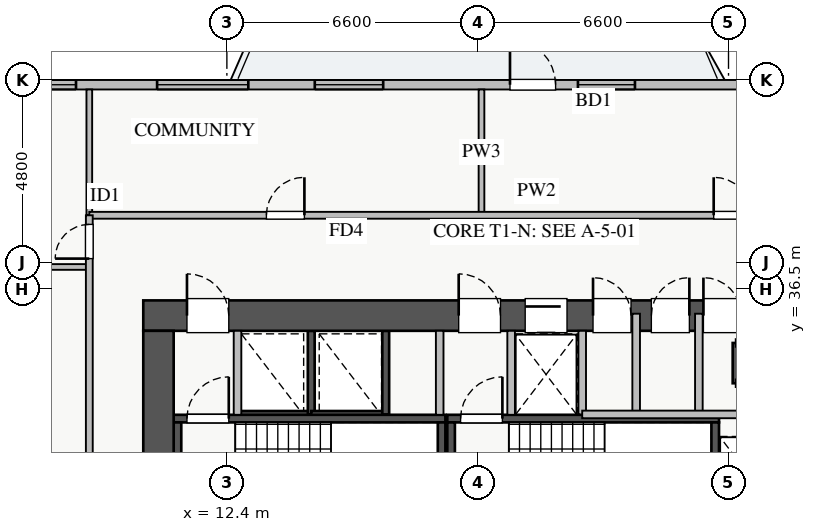
"""IFC4 building model, lengths in metres.
Left out: names, types, materials, properties, quantities, classifications, styles, units other than length and angle.
Written with IfcOpenShell. Run it as: python <this file> out.ifc"""

import sys

from ifc_helpers import new_model, si_unit, direction, frame, frame_2d, origin, place, context, subcontext, project, spatial, rectangle, extrude, source, transform, mapped, element, fill, save


model = new_model("IFC4")
c1 = context("Model", 3, precision=1e-05, world=origin(), true_north=direction((0.0, 1.0)))
c2 = subcontext(c1, "Body", "Model", "MODEL_VIEW")
j1 = project(units=[si_unit("LENGTHUNIT", "METRE"), si_unit("PLANEANGLEUNIT", "RADIAN")], contexts=[c1])
p1 = place(None, origin())
s1 = spatial("IfcSite", under=j1, at=p1, CompositionType="ELEMENT")
p2 = place(p1, origin())
s2 = spatial("IfcBuilding", under=s1, at=p2, CompositionType="ELEMENT")
p3 = place(p2, frame((0.0, 0.0, 29.5)))
s3 = spatial("IfcBuildingStorey", under=s2, at=p3, CompositionType="ELEMENT", Elevation=29.5)
p4 = place(p3, frame((12.68, 33.2, 0.0), z_axis=(0.0, 0.0, 1.0), x_axis=(1.0, 0.0, 0.0)))
e1 = element("IfcWall", 1, at=p4, inside=s3, PredefinedType="SHEAR", context=c2, shape_type="SweptSolid", body=[
    extrude(rectangle(XDim=1.94, YDim=0.18, at=frame_2d((0.97, 0.0))), origin(), (0.0, 0.0, 1.0), 3.07),
])
p5 = place(p3, frame((14.62, 33.2, 0.0), z_axis=(0.0, 0.0, 1.0), x_axis=(0.0, 1.0, 0.0)))
e2 = element("IfcWall", 2, at=p5, inside=s3, PredefinedType="SHEAR", context=c2, shape_type="SweptSolid", body=[
    extrude(rectangle(XDim=2.2, YDim=0.18, at=frame_2d((1.1, 0.0))), origin(), (0.0, 0.0, 1.0), 3.07),
])
p6 = place(p3, frame((25.8, 34.02, 0.0), z_axis=(0.0, 0.0, 1.0), x_axis=(0.0, 1.0, 0.0)))
e3 = element("IfcWall", 3, at=p6, inside=s3, PredefinedType="SHEAR", context=c2, shape_type="SweptSolid", body=[
    extrude(rectangle(XDim=1.06, YDim=0.18, at=frame_2d((0.53, 0.0))), origin(), (0.0, 0.0, 1.0), 3.07),
])
p7 = place(p3, frame((14.62, 33.2, 0.0), z_axis=(0.0, 0.0, 1.0), x_axis=(1.0, 0.0, 0.0)))
e4 = element("IfcWall", 4, at=p7, inside=s3, PredefinedType="SHEAR", context=c2, shape_type="SweptSolid", body=[
    extrude(rectangle(XDim=1.96, YDim=0.18, at=frame_2d((0.98, 0.0))), origin(), (0.0, 0.0, 1.0), 3.07),
])
p8 = place(p3, frame((16.58, 33.2, 0.0), z_axis=(0.0, 0.0, 1.0), x_axis=(0.0, 1.0, 0.0)))
e5 = element("IfcWall", 5, at=p8, inside=s3, PredefinedType="SHEAR", context=c2, shape_type="SweptSolid", body=[
    extrude(rectangle(XDim=2.2, YDim=0.18, at=frame_2d((1.1, 0.0))), origin(), (0.0, 0.0, 1.0), 3.07),
])
p9 = place(p3, frame((19.88, 33.2, 0.0), z_axis=(0.0, 0.0, 1.0), x_axis=(1.0, 0.0, 0.0)))
e6 = element("IfcWall", 6, at=p9, inside=s3, PredefinedType="SHEAR", context=c2, shape_type="SweptSolid", body=[
    extrude(rectangle(XDim=1.87, YDim=0.18, at=frame_2d((0.935, 0.0))), origin(), (0.0, 0.0, 1.0), 3.07),
])
p10 = place(p3, frame((11.0, 33.09, 0.0), z_axis=(0.0, 0.0, 1.0), x_axis=(1.0, 0.0, 0.0)))
e7 = element("IfcWall", 7, at=p10, inside=s3, PredefinedType="SHEAR", context=c2, shape_type="SweptSolid", body=[
    extrude(rectangle(XDim=7.15, YDim=0.2, at=frame_2d((3.575, 0.0))), origin(), (0.0, 0.0, 1.0), 3.25),
])
p11 = place(p10, frame((0.35, 0.0, 0.0)))
e8 = element("IfcOpeningElement", 8, at=p11, cuts=e7, PredefinedType="OPENING", context=c2, shape_type="SweptSolid", body=[
    extrude(rectangle(XDim=1.1, YDim=2.05, at=frame_2d((0.55, 1.025))), frame((0.0, 0.11, 0.0), z_axis=(0.0, -1.0, 0.0), x_axis=(1.0, 0.0, 0.0)), (0.0, 0.0, 1.0), 0.22),
])
for number, where, z_axis, x_axis in (
    (9, (11.1, 30.05, 0.0), (0.0, 0.0, 1.0), (0.0, 1.0, 0.0)),
    (10, (18.05, 30.05, 0.0), (0.0, 0.0, 1.0), (0.0, 1.0, 0.0)),
):
    element("IfcWall", number, at=place(p3, frame(where, z_axis=z_axis, x_axis=x_axis)), inside=s3, PredefinedType="SHEAR", context=c2, shape_type="SweptSolid", body=[
        extrude(rectangle(XDim=2.94, YDim=0.2, at=frame_2d((1.47, 0.0))), origin(), (0.0, 0.0, 1.0), 3.25),
    ])
p12 = place(p3, frame((18.2, 33.09, 0.0), z_axis=(0.0, 0.0, 1.0), x_axis=(1.0, 0.0, 0.0)))
e11 = element("IfcWall", 11, at=p12, inside=s3, PredefinedType="SHEAR", context=c2, shape_type="SweptSolid", body=[
    extrude(rectangle(XDim=7.15, YDim=0.2, at=frame_2d((3.575, 0.0))), origin(), (0.0, 0.0, 1.0), 3.25),
])
p13 = place(p12, frame((0.35, 0.0, 0.0)))
e12 = element("IfcOpeningElement", 12, at=p13, cuts=e11, PredefinedType="OPENING", context=c2, shape_type="SweptSolid", body=[
    extrude(rectangle(XDim=1.1, YDim=2.05, at=frame_2d((0.55, 1.025))), frame((0.0, 0.11, 0.0), z_axis=(0.0, -1.0, 0.0), x_axis=(1.0, 0.0, 0.0)), (0.0, 0.0, 1.0), 0.22),
])
for number, where, z_axis, x_axis in (
    (13, (18.3, 30.05, 0.0), (0.0, 0.0, 1.0), (0.0, 1.0, 0.0)),
    (14, (25.25, 30.05, 0.0), (0.0, 0.0, 1.0), (0.0, 1.0, 0.0)),
):
    element("IfcWall", number, at=place(p3, frame(where, z_axis=z_axis, x_axis=x_axis)), inside=s3, PredefinedType="SHEAR", context=c2, shape_type="SweptSolid", body=[
        extrude(rectangle(XDim=2.94, YDim=0.2, at=frame_2d((1.47, 0.0))), origin(), (0.0, 0.0, 1.0), 3.25),
    ])
p14 = place(p3, frame((10.2, 35.8, 0.0), z_axis=(0.0, 0.0, 1.0), x_axis=(1.0, 0.0, 0.0)))
e15 = element("IfcWall", 15, at=p14, inside=s3, PredefinedType="SHEAR", context=c2, shape_type="SweptSolid", body=[
    extrude(rectangle(XDim=17.6, YDim=0.8, at=frame_2d((8.8, 0.0))), origin(), (0.0, 0.0, 1.0), 3.25),
])
p15 = place(p14, frame((1.15, 0.0, 0.0)))
e16 = element("IfcOpeningElement", 16, at=p15, cuts=e15, PredefinedType="OPENING", context=c2, shape_type="SweptSolid", body=[
    extrude(rectangle(XDim=1.1, YDim=2.05, at=frame_2d((0.55, 1.025))), frame((0.0, 0.41, 0.0), z_axis=(0.0, -1.0, 0.0), x_axis=(1.0, 0.0, 0.0)), (0.0, 0.0, 1.0), 0.82),
])
p16 = place(p14, frame((8.3, 0.0, 0.0)))
e17 = element("IfcOpeningElement", 17, at=p16, cuts=e15, PredefinedType="OPENING", context=c2, shape_type="SweptSolid", body=[
    extrude(rectangle(XDim=1.1, YDim=2.05, at=frame_2d((0.55, 1.025))), frame((0.0, 0.41, 0.0), z_axis=(0.0, -1.0, 0.0), x_axis=(1.0, 0.0, 0.0)), (0.0, 0.0, 1.0), 0.82),
])
p17 = place(p14, frame((10.05, 0.0, 0.0)))
e18 = element("IfcOpeningElement", 18, at=p17, cuts=e15, PredefinedType="OPENING", context=c2, shape_type="SweptSolid", body=[
    extrude(rectangle(XDim=1.1, YDim=2.05, at=frame_2d((0.55, 1.025))), frame((0.0, 0.41, 0.0), z_axis=(0.0, -1.0, 0.0), x_axis=(1.0, 0.0, 0.0)), (0.0, 0.0, 1.0), 0.82),
])
p18 = place(p14, frame((14.74, 0.0, 0.0)))
e19 = element("IfcOpeningElement", 19, at=p18, cuts=e15, PredefinedType="OPENING", context=c2, shape_type="SweptSolid", body=[
    extrude(rectangle(XDim=1.0, YDim=2.05, at=frame_2d((0.5, 1.025))), frame((0.0, 0.41, 0.0), z_axis=(0.0, -1.0, 0.0), x_axis=(1.0, 0.0, 0.0)), (0.0, 0.0, 1.0), 0.82),
])
p19 = place(p14, frame((11.835, 0.0, 0.0)))
e20 = element("IfcOpeningElement", 20, at=p19, cuts=e15, PredefinedType="OPENING", context=c2, shape_type="SweptSolid", body=[
    extrude(rectangle(XDim=1.0, YDim=2.05, at=frame_2d((0.5, 1.025))), frame((0.0, 0.41, 0.0), z_axis=(0.0, -1.0, 0.0), x_axis=(1.0, 0.0, 0.0)), (0.0, 0.0, 1.0), 0.82),
])
p20 = place(p14, frame((13.37, 0.0, 0.0)))
e21 = element("IfcOpeningElement", 21, at=p20, cuts=e15, PredefinedType="OPENING", context=c2, shape_type="SweptSolid", body=[
    extrude(rectangle(XDim=1.0, YDim=2.05, at=frame_2d((0.5, 1.025))), frame((0.0, 0.41, 0.0), z_axis=(0.0, -1.0, 0.0), x_axis=(1.0, 0.0, 0.0)), (0.0, 0.0, 1.0), 0.82),
])
p21 = place(p3, frame((10.6, 29.8, 0.0), z_axis=(0.0, 0.0, 1.0), x_axis=(0.0, 1.0, 0.0)))
e22 = element("IfcWall", 22, at=p21, inside=s3, PredefinedType="SHEAR", context=c2, shape_type="SweptSolid", body=[
    extrude(rectangle(XDim=5.6, YDim=0.8, at=frame_2d((2.8, 0.0))), origin(), (0.0, 0.0, 1.0), 3.25),
])
p22 = place(p3, frame((5.45, 41.875, 0.0), z_axis=(0.0, 0.0, 1.0), x_axis=(1.0, 0.0, 0.0)))
e23 = element("IfcWall", 23, at=p22, inside=s3, PredefinedType="STANDARD", context=c2, shape_type="SweptSolid", body=[
    extrude(rectangle(XDim=27.1, YDim=0.25, at=frame_2d((13.55, 0.0))), origin(), (0.0, 0.0, 1.0), 2.61),
])
p23 = place(p22, frame((14.4, 0.0, 0.0)))
e24 = element("IfcOpeningElement", 24, at=p23, cuts=e23, PredefinedType="OPENING", context=c2, shape_type="SweptSolid", body=[
    extrude(rectangle(XDim=1.2, YDim=2.1, at=frame_2d((0.6, 1.05))), frame((0.0, 0.135, 0.0), z_axis=(0.0, -1.0, 0.0), x_axis=(1.0, 0.0, 0.0)), (0.0, 0.0, 1.0), 0.27),
])
p24 = place(p22, frame((1.48, 0.0, 0.9)))
e25 = element("IfcOpeningElement", 25, at=p24, cuts=e23, PredefinedType="OPENING", context=c2, shape_type="SweptSolid", body=[
    extrude(rectangle(XDim=1.5, YDim=1.5, at=frame_2d((0.75, 0.75))), frame((0.0, 0.135, 0.0), z_axis=(0.0, -1.0, 0.0), x_axis=(1.0, 0.0, 0.0)), (0.0, 0.0, 1.0), 0.27),
])
p25 = place(p22, frame((9.263, 0.0, 0.9)))
e26 = element("IfcOpeningElement", 26, at=p25, cuts=e23, PredefinedType="OPENING", context=c2, shape_type="SweptSolid", body=[
    extrude(rectangle(XDim=1.8, YDim=1.45, at=frame_2d((0.9, 0.725))), frame((0.0, 0.135, 0.0), z_axis=(0.0, -1.0, 0.0), x_axis=(1.0, 0.0, 0.0)), (0.0, 0.0, 1.0), 0.27),
])
p26 = place(p22, frame((16.188, 0.0, 0.9)))
e27 = element("IfcOpeningElement", 27, at=p26, cuts=e23, PredefinedType="OPENING", context=c2, shape_type="SweptSolid", body=[
    extrude(rectangle(XDim=1.5, YDim=1.45, at=frame_2d((0.75, 0.725))), frame((0.0, 0.135, 0.0), z_axis=(0.0, -1.0, 0.0), x_axis=(1.0, 0.0, 0.0)), (0.0, 0.0, 1.0), 0.27),
])
p27 = place(p22, frame((22.663, 0.0, 0.9)))
e28 = element("IfcOpeningElement", 28, at=p27, cuts=e23, PredefinedType="OPENING", context=c2, shape_type="SweptSolid", body=[
    extrude(rectangle(XDim=2.1, YDim=1.48, at=frame_2d((1.05, 0.74))), frame((0.0, 0.135, 0.0), z_axis=(0.0, -1.0, 0.0), x_axis=(1.0, 0.0, 0.0)), (0.0, 0.0, 1.0), 0.27),
])
p28 = place(p22, frame((5.114, 0.0, 0.9)))
e29 = element("IfcOpeningElement", 29, at=p28, cuts=e23, PredefinedType="OPENING", context=c2, shape_type="SweptSolid", body=[
    extrude(rectangle(XDim=2.4, YDim=1.5, at=frame_2d((1.2, 0.75))), frame((0.0, 0.135, 0.0), z_axis=(0.0, -1.0, 0.0), x_axis=(1.0, 0.0, 0.0)), (0.0, 0.0, 1.0), 0.27),
])
for number, where, z_axis, x_axis in (
    (30, (12.68, 33.19, 0.0), (0.0, 0.0, 1.0), (0.0, 1.0, 0.0)),
    (31, (18.0, 33.19, 0.0), (0.0, 0.0, 1.0), (0.0, 1.0, 0.0)),
    (32, (19.88, 33.19, 0.0), (0.0, 0.0, 1.0), (0.0, 1.0, 0.0)),
):
    element("IfcWall", number, at=place(p3, frame(where, z_axis=z_axis, x_axis=x_axis)), inside=s3, PredefinedType="PARTITIONING", context=c2, shape_type="SweptSolid", body=[
        extrude(rectangle(XDim=2.21, YDim=0.2, at=frame_2d((1.105, 0.0))), origin(), (0.0, 0.0, 1.0), 3.07),
    ])
p29 = place(p3, frame((24.82, 33.2, 0.0), z_axis=(0.0, 0.0, 1.0), x_axis=(0.0, 1.0, 0.0)))
e33 = element("IfcWall", 33, at=p29, inside=s3, PredefinedType="PARTITIONING", context=c2, shape_type="SweptSolid", body=[
    extrude(rectangle(XDim=2.65, YDim=0.2, at=frame_2d((1.325, 0.0))), origin(), (0.0, 0.0, 1.0), 3.07),
])
p30 = place(p3, frame((21.75, 33.2, 0.0), z_axis=(0.0, 0.0, 1.0), x_axis=(0.0, 1.0, 0.0)))
e34 = element("IfcWall", 34, at=p30, inside=s3, PredefinedType="PARTITIONING", context=c2, shape_type="SweptSolid", body=[
    extrude(rectangle(XDim=2.2, YDim=0.2, at=frame_2d((1.1, 0.0))), origin(), (0.0, 0.0, 1.0), 3.07),
])
p31 = place(p3, frame((23.17, 33.2, 0.0), z_axis=(0.0, 0.0, 1.0), x_axis=(0.0, 1.0, 0.0)))
e35 = element("IfcWall", 35, at=p31, inside=s3, PredefinedType="PARTITIONING", context=c2, shape_type="SweptSolid", body=[
    extrude(rectangle(XDim=2.65, YDim=0.2, at=frame_2d((1.325, 0.0))), origin(), (0.0, 0.0, 1.0), 3.07),
])
p32 = place(p3, frame((21.75, 33.2, 0.0), z_axis=(0.0, 0.0, 1.0), x_axis=(1.0, 0.0, 0.0)))
e36 = element("IfcWall", 36, at=p32, inside=s3, PredefinedType="PARTITIONING", context=c2, shape_type="SweptSolid", body=[
    extrude(rectangle(XDim=5.17, YDim=0.2, at=frame_2d((2.585, 0.0))), origin(), (0.0, 0.0, 1.0), 3.07),
])
p33 = place(p3, frame((19.1, 38.44, 0.0), z_axis=(0.0, 0.0, 1.0), x_axis=(0.0, 1.0, 0.0)))
e37 = element("IfcWall", 37, at=p33, inside=s3, PredefinedType="PARTITIONING", context=c2, shape_type="SweptSolid", body=[
    extrude(rectangle(XDim=3.31, YDim=0.15, at=frame_2d((1.655, 0.0))), origin(), (0.0, 0.0, 1.0), 2.765),
])
p34 = place(p3, frame((8.78, 38.44, 0.0), z_axis=(0.0, 0.0, 1.0), x_axis=(0.0, 1.0, 0.0)))
e38 = element("IfcWall", 38, at=p34, inside=s3, PredefinedType="PARTITIONING", context=c2, shape_type="SweptSolid", body=[
    extrude(rectangle(XDim=3.31, YDim=0.15, at=frame_2d((1.655, 0.0))), origin(), (0.0, 0.0, 1.0), 3.07),
])
p35 = place(p3, frame((8.78, 38.44, 0.0), z_axis=(0.0, 0.0, 1.0), x_axis=(1.0, 0.0, 0.0)))
e39 = element("IfcWall", 39, at=p35, inside=s3, PredefinedType="PARTITIONING", context=c2, shape_type="SweptSolid", body=[
    extrude(rectangle(XDim=23.54, YDim=0.18, at=frame_2d((11.77, 0.0))), origin(), (0.0, 0.0, 1.0), 3.07),
])
p36 = place(p35, frame((4.66, 0.0, 0.0)))
e40 = element("IfcOpeningElement", 40, at=p36, cuts=e39, PredefinedType="OPENING", context=c2, shape_type="SweptSolid", body=[
    extrude(rectangle(XDim=1.0, YDim=2.05, at=frame_2d((0.5, 1.025))), frame((0.0, 0.1, 0.0), z_axis=(0.0, -1.0, 0.0), x_axis=(1.0, 0.0, 0.0)), (0.0, 0.0, 1.0), 0.2),
])
p37 = place(p35, frame((16.43, 0.0, 0.0)))
e41 = element("IfcOpeningElement", 41, at=p37, cuts=e39, PredefinedType="OPENING", context=c2, shape_type="SweptSolid", body=[
    extrude(rectangle(XDim=1.0, YDim=2.05, at=frame_2d((0.5, 1.025))), frame((0.0, 0.1, 0.0), z_axis=(0.0, -1.0, 0.0), x_axis=(1.0, 0.0, 0.0)), (0.0, 0.0, 1.0), 0.2),
])
p38 = place(p3, frame((0.25, 37.08, 0.0), z_axis=(0.0, 0.0, 1.0), x_axis=(1.0, 0.0, 0.0)))
e42 = element("IfcWall", 42, at=p38, inside=s3, PredefinedType="PARTITIONING", context=c2, shape_type="SweptSolid", body=[
    extrude(rectangle(XDim=8.53, YDim=0.15, at=frame_2d((4.265, 0.0))), origin(), (0.0, 0.0, 1.0), 3.07),
])
p39 = place(p3, frame((8.78, 7.21, 0.0), z_axis=(0.0, 0.0, 1.0), x_axis=(0.0, 1.0, 0.0)))
e43 = element("IfcWall", 43, at=p39, inside=s3, PredefinedType="PARTITIONING", context=c2, shape_type="SweptSolid", body=[
    extrude(rectangle(XDim=31.23, YDim=0.18, at=frame_2d((15.615, 0.0))), origin(), (0.0, 0.0, 1.0), 3.07),
])
p40 = place(p39, frame((30.09, 0.0, 0.0)))
e44 = element("IfcOpeningElement", 44, at=p40, cuts=e43, PredefinedType="OPENING", context=c2, shape_type="SweptSolid", body=[
    extrude(rectangle(XDim=0.9, YDim=2.05, at=frame_2d((0.45, 1.025))), frame((0.0, 0.1, 0.0), z_axis=(0.0, -1.0, 0.0), x_axis=(1.0, 0.0, 0.0)), (0.0, 0.0, 1.0), 0.2),
])
p41 = place(p39, frame((0.24, 0.0, 0.0)))
e45 = element("IfcOpeningElement", 45, at=p41, cuts=e43, PredefinedType="OPENING", context=c2, shape_type="SweptSolid", body=[
    extrude(rectangle(XDim=0.9, YDim=2.05, at=frame_2d((0.45, 1.025))), frame((0.0, 0.1, 0.0), z_axis=(0.0, -1.0, 0.0), x_axis=(1.0, 0.0, 0.0)), (0.0, 0.0, 1.0), 0.2),
])
p42 = place(p39, frame((3.975, 0.0, 0.0)))
e46 = element("IfcOpeningElement", 46, at=p42, cuts=e43, PredefinedType="OPENING", context=c2, shape_type="SweptSolid", body=[
    extrude(rectangle(XDim=1.0, YDim=2.05, at=frame_2d((0.5, 1.025))), frame((0.0, 0.1, 0.0), z_axis=(0.0, -1.0, 0.0), x_axis=(1.0, 0.0, 0.0)), (0.0, 0.0, 1.0), 0.2),
])
p43 = place(p39, frame((22.0, 0.0, 0.0)))
e47 = element("IfcOpeningElement", 47, at=p43, cuts=e43, PredefinedType="OPENING", context=c2, shape_type="SweptSolid", body=[
    extrude(rectangle(XDim=1.0, YDim=2.05, at=frame_2d((0.5, 1.025))), frame((0.0, 0.1, 0.0), z_axis=(0.0, -1.0, 0.0), x_axis=(1.0, 0.0, 0.0)), (0.0, 0.0, 1.0), 0.2),
])
m1 = source(origin(), c2, "Body", "SweptSolid", [
    extrude(rectangle(XDim=1.2, YDim=2.1, at=frame_2d((0.6, 1.05))), frame((0.0, 0.025, 0.0), z_axis=(0.0, -1.0, 0.0), x_axis=(1.0, 0.0, 0.0)), (0.0, 0.0, 1.0), 0.05),
])
p44 = place(p23, origin())
e48 = element("IfcDoor", 48, at=p44, inside=s3, OperationType="SINGLE_SWING_LEFT", PredefinedType="DOOR", context=c2, shape_type="MappedRepresentation", body=[
    mapped(m1, transform((0.0, 0.0, 0.0), x_axis=(1.0, 0.0, 0.0), y_axis=(0.0, 1.0, 0.0), z_axis=(0.0, 0.0, 1.0), scale=1.0)),
])
fill(e24, e48)
m2 = source(origin(), c2, "Body", "SweptSolid", [
    extrude(rectangle(XDim=1.5, YDim=1.5, at=frame_2d((0.75, 0.75))), frame((0.0, 0.03, 0.0), z_axis=(0.0, -1.0, 0.0), x_axis=(1.0, 0.0, 0.0)), (0.0, 0.0, 1.0), 0.06),
])
p45 = place(p24, origin())
e49 = element("IfcWindow", 49, at=p45, inside=s3, PartitioningType="TRIPLE_PANEL_VERTICAL", PredefinedType="WINDOW", context=c2, shape_type="MappedRepresentation", body=[
    mapped(m2, transform((0.0, 0.0, 0.0), x_axis=(1.0, 0.0, 0.0), y_axis=(0.0, 1.0, 0.0), z_axis=(0.0, 0.0, 1.0), scale=1.0)),
])
fill(e25, e49)
m3 = source(origin(), c2, "Body", "SweptSolid", [
    extrude(rectangle(XDim=1.8, YDim=1.45, at=frame_2d((0.9, 0.725))), frame((0.0, 0.03, 0.0), z_axis=(0.0, -1.0, 0.0), x_axis=(1.0, 0.0, 0.0)), (0.0, 0.0, 1.0), 0.06),
])
p46 = place(p25, origin())
e50 = element("IfcWindow", 50, at=p46, inside=s3, PartitioningType="DOUBLE_PANEL_VERTICAL", PredefinedType="WINDOW", context=c2, shape_type="MappedRepresentation", body=[
    mapped(m3, transform((0.0, 0.0, 0.0), x_axis=(1.0, 0.0, 0.0), y_axis=(0.0, 1.0, 0.0), z_axis=(0.0, 0.0, 1.0), scale=1.0)),
])
fill(e26, e50)
m4 = source(origin(), c2, "Body", "SweptSolid", [
    extrude(rectangle(XDim=1.5, YDim=1.45, at=frame_2d((0.75, 0.725))), frame((0.0, 0.03, 0.0), z_axis=(0.0, -1.0, 0.0), x_axis=(1.0, 0.0, 0.0)), (0.0, 0.0, 1.0), 0.06),
])
p47 = place(p26, origin())
e51 = element("IfcWindow", 51, at=p47, inside=s3, PartitioningType="DOUBLE_PANEL_VERTICAL", PredefinedType="WINDOW", context=c2, shape_type="MappedRepresentation", body=[
    mapped(m4, transform((0.0, 0.0, 0.0), x_axis=(1.0, 0.0, 0.0), y_axis=(0.0, 1.0, 0.0), z_axis=(0.0, 0.0, 1.0), scale=1.0)),
])
fill(e27, e51)
m5 = source(origin(), c2, "Body", "SweptSolid", [
    extrude(rectangle(XDim=1.1, YDim=2.05, at=frame_2d((0.55, 1.025))), frame((0.0, 0.025, 0.0), z_axis=(0.0, -1.0, 0.0), x_axis=(1.0, 0.0, 0.0)), (0.0, 0.0, 1.0), 0.05),
])
p48 = place(p15, origin())
e52 = element("IfcDoor", 52, at=p48, inside=s3, OperationType="SINGLE_SWING_LEFT", PredefinedType="DOOR", context=c2, shape_type="MappedRepresentation", body=[
    mapped(m5, transform((0.0, 0.0, 0.0), x_axis=(1.0, 0.0, 0.0), y_axis=(0.0, 1.0, 0.0), z_axis=(0.0, 0.0, 1.0), scale=1.0)),
])
fill(e16, e52)
p49 = place(p11, origin())
e53 = element("IfcDoor", 53, at=p49, inside=s3, OperationType="SINGLE_SWING_RIGHT", PredefinedType="DOOR", context=c2, shape_type="MappedRepresentation", body=[
    mapped(m5, transform((0.0, 0.0, 0.0), x_axis=(1.0, 0.0, 0.0), y_axis=(0.0, 1.0, 0.0), z_axis=(0.0, 0.0, 1.0), scale=1.0)),
])
fill(e8, e53)
p50 = place(p16, origin())
e54 = element("IfcDoor", 54, at=p50, inside=s3, OperationType="SINGLE_SWING_LEFT", PredefinedType="DOOR", context=c2, shape_type="MappedRepresentation", body=[
    mapped(m5, transform((0.0, 0.0, 0.0), x_axis=(1.0, 0.0, 0.0), y_axis=(0.0, 1.0, 0.0), z_axis=(0.0, 0.0, 1.0), scale=1.0)),
])
fill(e17, e54)
p51 = place(p13, origin())
e55 = element("IfcDoor", 55, at=p51, inside=s3, OperationType="SINGLE_SWING_RIGHT", PredefinedType="DOOR", context=c2, shape_type="MappedRepresentation", body=[
    mapped(m5, transform((0.0, 0.0, 0.0), x_axis=(1.0, 0.0, 0.0), y_axis=(0.0, 1.0, 0.0), z_axis=(0.0, 0.0, 1.0), scale=1.0)),
])
fill(e12, e55)
p52 = place(p17, origin())
e56 = element("IfcDoor", 56, at=p52, inside=s3, OperationType="SLIDING_TO_LEFT", PredefinedType="DOOR", context=c2, shape_type="MappedRepresentation", body=[
    mapped(m5, transform((0.0, 0.0, 0.0), x_axis=(1.0, 0.0, 0.0), y_axis=(0.0, 1.0, 0.0), z_axis=(0.0, 0.0, 1.0), scale=1.0)),
])
fill(e18, e56)
m6 = source(origin(), c2, "Body", "SweptSolid", [
    extrude(rectangle(XDim=1.0, YDim=2.05, at=frame_2d((0.5, 1.025))), frame((0.0, 0.025, 0.0), z_axis=(0.0, -1.0, 0.0), x_axis=(1.0, 0.0, 0.0)), (0.0, 0.0, 1.0), 0.05),
])
p53 = place(p18, origin())
e57 = element("IfcDoor", 57, at=p53, inside=s3, OperationType="SINGLE_SWING_LEFT", PredefinedType="DOOR", context=c2, shape_type="MappedRepresentation", body=[
    mapped(m6, transform((0.0, 0.0, 0.0), x_axis=(1.0, 0.0, 0.0), y_axis=(0.0, 1.0, 0.0), z_axis=(0.0, 0.0, 1.0), scale=1.0)),
])
fill(e19, e57)
p54 = place(p19, origin())
e58 = element("IfcDoor", 58, at=p54, inside=s3, OperationType="SINGLE_SWING_LEFT", PredefinedType="DOOR", context=c2, shape_type="MappedRepresentation", body=[
    mapped(m6, transform((0.0, 0.0, 0.0), x_axis=(1.0, 0.0, 0.0), y_axis=(0.0, 1.0, 0.0), z_axis=(0.0, 0.0, 1.0), scale=1.0)),
])
fill(e20, e58)
p55 = place(p20, origin())
e59 = element("IfcDoor", 59, at=p55, inside=s3, OperationType="SINGLE_SWING_RIGHT", PredefinedType="DOOR", context=c2, shape_type="MappedRepresentation", body=[
    mapped(m6, transform((0.0, 0.0, 0.0), x_axis=(1.0, 0.0, 0.0), y_axis=(0.0, 1.0, 0.0), z_axis=(0.0, 0.0, 1.0), scale=1.0)),
])
fill(e21, e59)
p56 = place(p36, origin())
e60 = element("IfcDoor", 60, at=p56, inside=s3, OperationType="SINGLE_SWING_RIGHT", PredefinedType="DOOR", context=c2, shape_type="MappedRepresentation", body=[
    mapped(m6, transform((0.0, 0.0, 0.0), x_axis=(1.0, 0.0, 0.0), y_axis=(0.0, 1.0, 0.0), z_axis=(0.0, 0.0, 1.0), scale=1.0)),
])
fill(e40, e60)
p57 = place(p37, origin())
e61 = element("IfcDoor", 61, at=p57, inside=s3, OperationType="SINGLE_SWING_LEFT", PredefinedType="DOOR", context=c2, shape_type="MappedRepresentation", body=[
    mapped(m6, transform((0.0, 0.0, 0.0), x_axis=(1.0, 0.0, 0.0), y_axis=(0.0, 1.0, 0.0), z_axis=(0.0, 0.0, 1.0), scale=1.0)),
])
fill(e41, e61)
m7 = source(origin(), c2, "Body", "SweptSolid", [
    extrude(rectangle(XDim=0.9, YDim=2.05, at=frame_2d((0.45, 1.025))), frame((0.0, 0.025, 0.0), z_axis=(0.0, -1.0, 0.0), x_axis=(1.0, 0.0, 0.0)), (0.0, 0.0, 1.0), 0.05),
])
p58 = place(p40, origin())
e62 = element("IfcDoor", 62, at=p58, inside=s3, OperationType="SINGLE_SWING_LEFT", PredefinedType="DOOR", context=c2, shape_type="MappedRepresentation", body=[
    mapped(m7, transform((0.0, 0.0, 0.0), x_axis=(1.0, 0.0, 0.0), y_axis=(0.0, 1.0, 0.0), z_axis=(0.0, 0.0, 1.0), scale=1.0)),
])
fill(e44, e62)
m8 = source(origin(), c2, "Body", "SweptSolid", [
    extrude(rectangle(XDim=2.4, YDim=1.5, at=frame_2d((1.2, 0.75))), frame((0.0, 0.03, 0.0), z_axis=(0.0, -1.0, 0.0), x_axis=(1.0, 0.0, 0.0)), (0.0, 0.0, 1.0), 0.06),
])
p59 = place(p28, origin())
e63 = element("IfcWindow", 63, at=p59, inside=s3, PartitioningType="TRIPLE_PANEL_VERTICAL", PredefinedType="WINDOW", context=c2, shape_type="MappedRepresentation", body=[
    mapped(m8, transform((0.0, 0.0, 0.0), x_axis=(1.0, 0.0, 0.0), y_axis=(0.0, 1.0, 0.0), z_axis=(0.0, 0.0, 1.0), scale=1.0)),
])
fill(e29, e63)
save(model, sys.argv[1])
